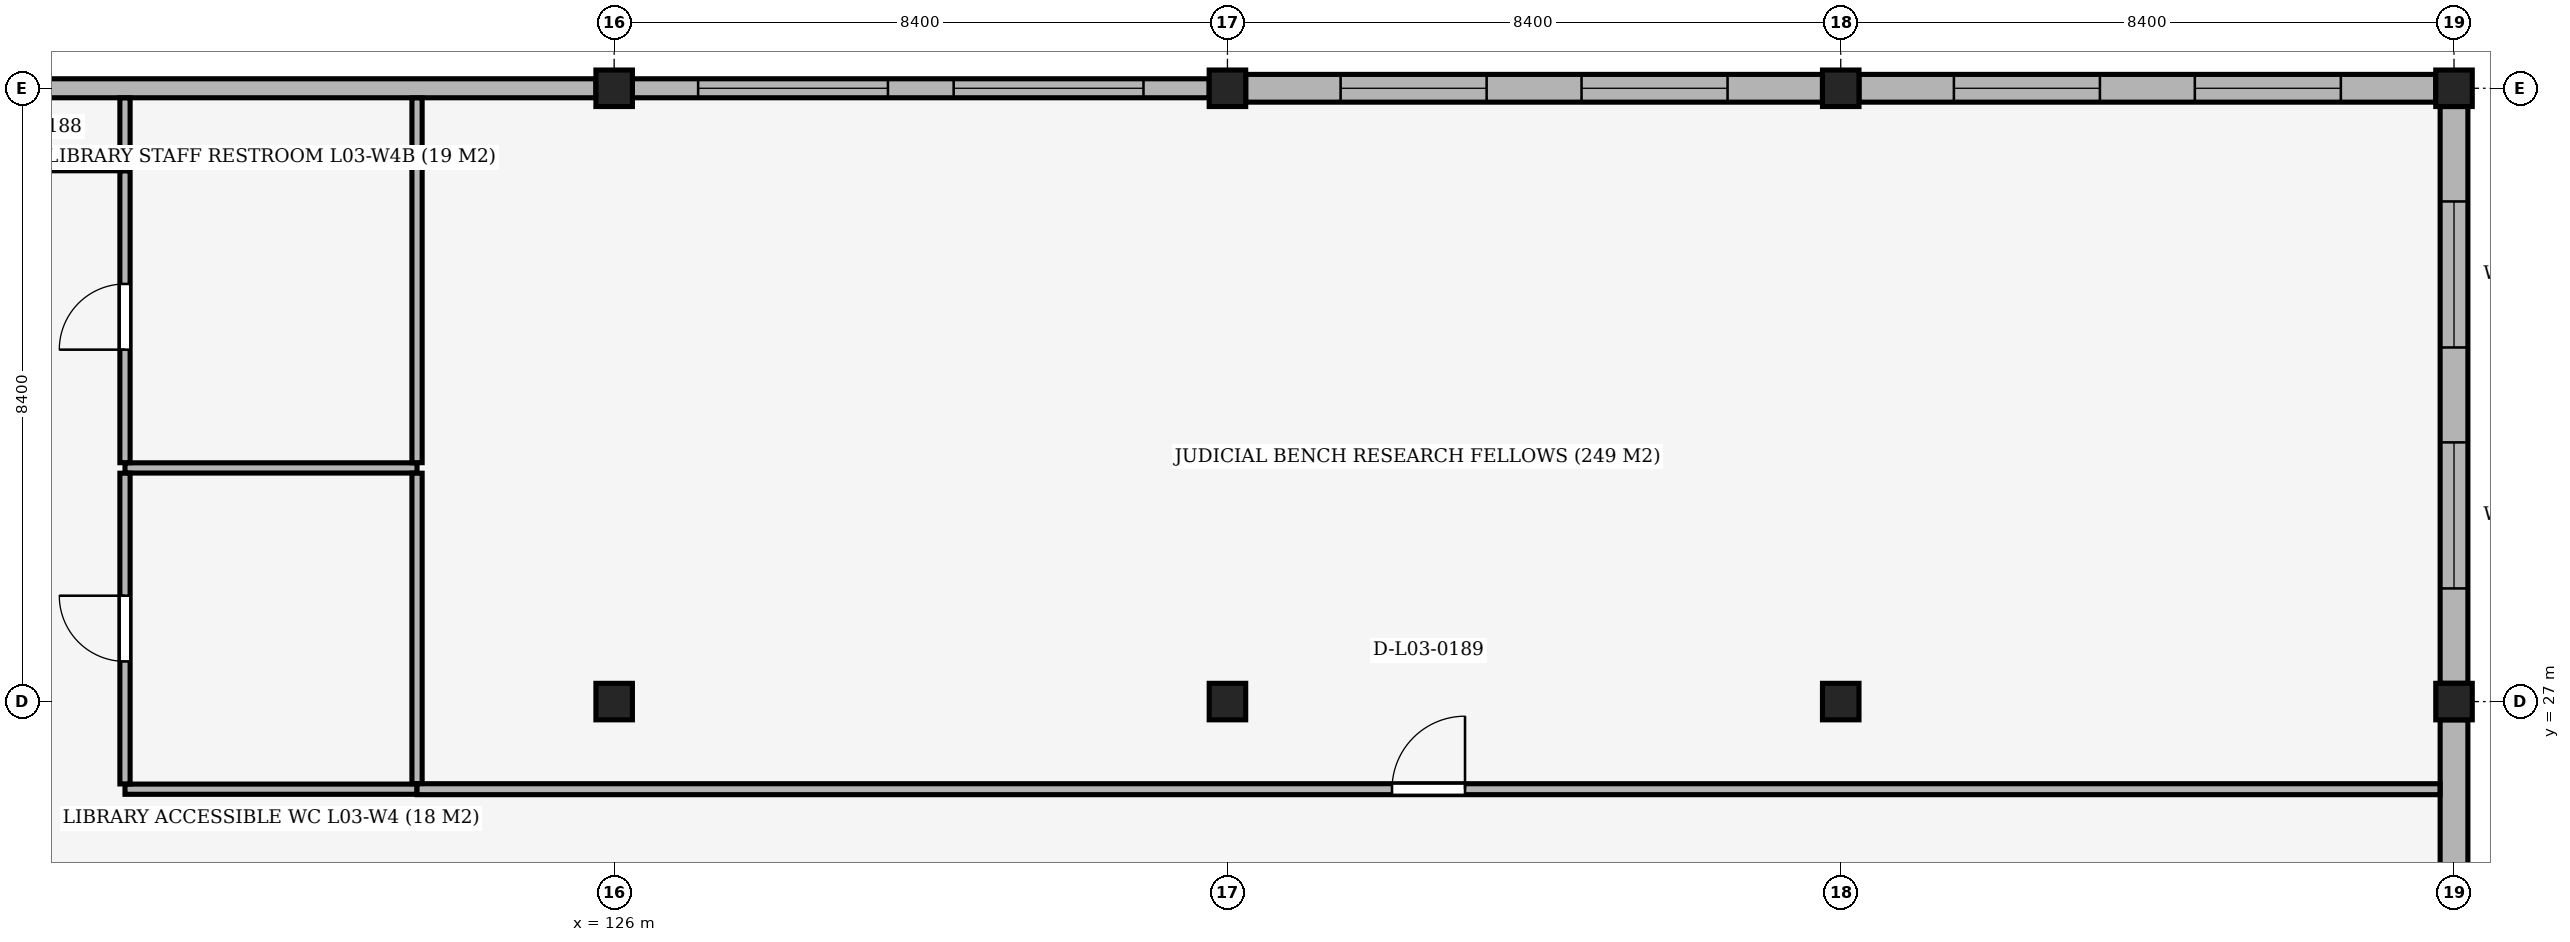
"""IFC4 building model, lengths in metres.
Left out: names, types, materials, properties, quantities, classifications, styles, units other than length and angle.
Written with IfcOpenShell. Run it as: python <this file> out.ifc"""

import sys

from ifc_helpers import new_model, si_unit, direction, frame, frame_2d, origin, origin_2d, place, context, subcontext, project, spatial, rectangle, extrude, element, fill, save


model = new_model("IFC4")
c1 = context("Model", 3, precision=1e-05, world=origin(), true_north=direction((0.0, 1.0)))
c2 = subcontext(c1, "Body", "Model", "MODEL_VIEW")
j1 = project(units=[si_unit("LENGTHUNIT", "METRE"), si_unit("PLANEANGLEUNIT", "RADIAN")], contexts=[c1])
p1 = place(None, origin())
s1 = spatial("IfcSite", under=j1, at=p1, CompositionType="ELEMENT")
p2 = place(p1, origin())
s2 = spatial("IfcBuilding", under=s1, at=p2, CompositionType="ELEMENT")
p3 = place(p2, frame((0.0, 0.0, 15.3)))
s3 = spatial("IfcBuildingStorey", under=s2, at=p3, CompositionType="ELEMENT", Elevation=15.3)
for number, where, z_axis, x_axis in (
    (1, (126.0, 27.0, 0.0), (0.0, 0.0, 1.0), (1.0, 0.0, 0.0)),
    (2, (126.0, 35.4, 0.0), (0.0, 0.0, 1.0), (1.0, 0.0, 0.0)),
    (3, (134.4, 27.0, 0.0), (0.0, 0.0, 1.0), (1.0, 0.0, 0.0)),
    (4, (134.4, 35.4, 0.0), (0.0, 0.0, 1.0), (1.0, 0.0, 0.0)),
    (5, (142.8, 27.0, 0.0), (0.0, 0.0, 1.0), (1.0, 0.0, 0.0)),
    (6, (142.8, 35.4, 0.0), (0.0, 0.0, 1.0), (1.0, 0.0, 0.0)),
    (7, (151.2, 27.0, 0.0), (0.0, 0.0, 1.0), (1.0, 0.0, 0.0)),
    (8, (151.2, 35.4, 0.0), (0.0, 0.0, 1.0), (1.0, 0.0, 0.0)),
):
    element("IfcColumn", number, at=place(p3, frame(where, z_axis=z_axis, x_axis=x_axis)), inside=s3, PredefinedType="COLUMN", context=c2, shape_type="SweptSolid", body=[
        extrude(rectangle(XDim=0.5, YDim=0.5, at=origin_2d()), origin(), (0.0, 0.0, 1.0), 5.1),
    ])
p4 = place(p3, frame((151.2, 35.15, 0.0), z_axis=(0.0, 0.0, 1.0), x_axis=(0.0, -1.0, 0.0)))
e9 = element("IfcWall", 9, at=p4, inside=s3, PredefinedType="SOLIDWALL", context=c2, shape_type="SweptSolid", body=[
    extrude(rectangle(XDim=7.9, YDim=0.38, at=frame_2d((3.95, 0.0))), origin(), (0.0, 0.0, 1.0), 4.14),
])
p5 = place(p4, frame((1.3, 0.0, 2.1)))
e10 = element("IfcOpeningElement", 10, at=p5, cuts=e9, PredefinedType="OPENING", context=c2, shape_type="SweptSolid", body=[
    extrude(rectangle(XDim=2.0, YDim=1.2, at=frame_2d((1.0, 0.6))), frame((0.0, 0.205, 0.0), z_axis=(0.0, -1.0, 0.0), x_axis=(1.0, 0.0, 0.0)), (0.0, 0.0, 1.0), 0.41),
])
p6 = place(p4, frame((4.6, 0.0, 2.1)))
e11 = element("IfcOpeningElement", 11, at=p6, cuts=e9, PredefinedType="OPENING", context=c2, shape_type="SweptSolid", body=[
    extrude(rectangle(XDim=2.0, YDim=1.2, at=frame_2d((1.0, 0.6))), frame((0.0, 0.205, 0.0), z_axis=(0.0, -1.0, 0.0), x_axis=(1.0, 0.0, 0.0)), (0.0, 0.0, 1.0), 0.41),
])
p7 = place(p3, frame((151.2, 26.75, 0.0), z_axis=(0.0, 0.0, 1.0), x_axis=(0.0, -1.0, 0.0)))
e12 = element("IfcWall", 12, at=p7, inside=s3, PredefinedType="SOLIDWALL", context=c2, shape_type="SweptSolid", body=[
    extrude(rectangle(XDim=4.3, YDim=0.38, at=frame_2d((2.15, 0.0))), origin(), (0.0, 0.0, 1.0), 3.79),
])
p8 = place(p3, frame((117.85, 35.4, 0.0), z_axis=(0.0, 0.0, 1.0), x_axis=(1.0, 0.0, 0.0)))
e13 = element("IfcWall", 13, at=p8, inside=s3, PredefinedType="SOLIDWALL", context=c2, shape_type="SweptSolid", body=[
    extrude(rectangle(XDim=7.9, YDim=0.26, at=frame_2d((3.95, 0.0))), origin(), (0.0, 0.0, 1.0), 4.14),
])
p9 = place(p3, frame((126.25, 35.4, 0.0), z_axis=(0.0, 0.0, 1.0), x_axis=(1.0, 0.0, 0.0)))
e14 = element("IfcWall", 14, at=p9, inside=s3, PredefinedType="SOLIDWALL", context=c2, shape_type="SweptSolid", body=[
    extrude(rectangle(XDim=7.9, YDim=0.26, at=frame_2d((3.95, 0.0))), origin(), (0.0, 0.0, 1.0), 4.14),
])
p10 = place(p9, frame((0.9, 0.0, 1.8)))
e15 = element("IfcOpeningElement", 15, at=p10, cuts=e14, PredefinedType="OPENING", context=c2, shape_type="SweptSolid", body=[
    extrude(rectangle(XDim=2.6, YDim=1.5, at=frame_2d((1.3, 0.75))), frame((0.0, 0.145, 0.0), z_axis=(0.0, -1.0, 0.0), x_axis=(1.0, 0.0, 0.0)), (0.0, 0.0, 1.0), 0.29),
])
p11 = place(p9, frame((4.4, 0.0, 1.8)))
e16 = element("IfcOpeningElement", 16, at=p11, cuts=e14, PredefinedType="OPENING", context=c2, shape_type="SweptSolid", body=[
    extrude(rectangle(XDim=2.6, YDim=1.5, at=frame_2d((1.3, 0.75))), frame((0.0, 0.145, 0.0), z_axis=(0.0, -1.0, 0.0), x_axis=(1.0, 0.0, 0.0)), (0.0, 0.0, 1.0), 0.29),
])
p12 = place(p3, frame((134.65, 35.4, 0.0), z_axis=(0.0, 0.0, 1.0), x_axis=(1.0, 0.0, 0.0)))
e17 = element("IfcWall", 17, at=p12, inside=s3, PredefinedType="SOLIDWALL", context=c2, shape_type="SweptSolid", body=[
    extrude(rectangle(XDim=7.9, YDim=0.38, at=frame_2d((3.95, 0.0))), origin(), (0.0, 0.0, 1.0), 4.14),
])
p13 = place(p12, frame((1.3, 0.0, 2.1)))
e18 = element("IfcOpeningElement", 18, at=p13, cuts=e17, PredefinedType="OPENING", context=c2, shape_type="SweptSolid", body=[
    extrude(rectangle(XDim=2.0, YDim=1.2, at=frame_2d((1.0, 0.6))), frame((0.0, 0.205, 0.0), z_axis=(0.0, -1.0, 0.0), x_axis=(1.0, 0.0, 0.0)), (0.0, 0.0, 1.0), 0.41),
])
p14 = place(p12, frame((4.6, 0.0, 2.1)))
e19 = element("IfcOpeningElement", 19, at=p14, cuts=e17, PredefinedType="OPENING", context=c2, shape_type="SweptSolid", body=[
    extrude(rectangle(XDim=2.0, YDim=1.2, at=frame_2d((1.0, 0.6))), frame((0.0, 0.205, 0.0), z_axis=(0.0, -1.0, 0.0), x_axis=(1.0, 0.0, 0.0)), (0.0, 0.0, 1.0), 0.41),
])
p15 = place(p3, frame((143.05, 35.4, 0.0), z_axis=(0.0, 0.0, 1.0), x_axis=(1.0, 0.0, 0.0)))
e20 = element("IfcWall", 20, at=p15, inside=s3, PredefinedType="SOLIDWALL", context=c2, shape_type="SweptSolid", body=[
    extrude(rectangle(XDim=7.9, YDim=0.38, at=frame_2d((3.95, 0.0))), origin(), (0.0, 0.0, 1.0), 4.14),
])
p16 = place(p15, frame((1.3, 0.0, 2.1)))
e21 = element("IfcOpeningElement", 21, at=p16, cuts=e20, PredefinedType="OPENING", context=c2, shape_type="SweptSolid", body=[
    extrude(rectangle(XDim=2.0, YDim=1.2, at=frame_2d((1.0, 0.6))), frame((0.0, 0.205, 0.0), z_axis=(0.0, -1.0, 0.0), x_axis=(1.0, 0.0, 0.0)), (0.0, 0.0, 1.0), 0.41),
])
p17 = place(p15, frame((4.6, 0.0, 2.1)))
e22 = element("IfcOpeningElement", 22, at=p17, cuts=e20, PredefinedType="OPENING", context=c2, shape_type="SweptSolid", body=[
    extrude(rectangle(XDim=2.0, YDim=1.2, at=frame_2d((1.0, 0.6))), frame((0.0, 0.205, 0.0), z_axis=(0.0, -1.0, 0.0), x_axis=(1.0, 0.0, 0.0)), (0.0, 0.0, 1.0), 0.41),
])
p18 = place(p3, frame((119.3, 25.8, 0.0), z_axis=(0.0, 0.0, 1.0), x_axis=(1.0, 0.0, 0.0)))
e23 = element("IfcWall", 23, at=p18, inside=s3, PredefinedType="PARTITIONING", context=c2, shape_type="SweptSolid", body=[
    extrude(rectangle(XDim=4.0, YDim=0.14, at=frame_2d((2.0, 0.0))), origin(), (0.0, 0.0, 1.0), 4.84),
])
p19 = place(p3, frame((123.3, 25.8, 0.0), z_axis=(0.0, 0.0, 1.0), x_axis=(1.0, 0.0, 0.0)))
e24 = element("IfcWall", 24, at=p19, inside=s3, PredefinedType="PARTITIONING", context=c2, shape_type="SweptSolid", body=[
    extrude(rectangle(XDim=27.708, YDim=0.15, at=frame_2d((13.854, 0.0))), origin(), (0.0, 0.0, 1.0), 4.29),
])
p20 = place(p19, frame((13.354, 0.0, 0.0)))
e25 = element("IfcOpeningElement", 25, at=p20, cuts=e24, PredefinedType="OPENING", context=c2, shape_type="SweptSolid", body=[
    extrude(rectangle(XDim=1.0, YDim=2.1, at=frame_2d((0.5, 1.05))), frame((0.0, 0.09, 0.0), z_axis=(0.0, -1.0, 0.0), x_axis=(1.0, 0.0, 0.0)), (0.0, 0.0, 1.0), 0.18),
])
p21 = place(p3, frame((119.3, 30.2, 0.0), z_axis=(0.0, 0.0, 1.0), x_axis=(1.0, 0.0, 0.0)))
e26 = element("IfcWall", 26, at=p21, inside=s3, PredefinedType="PARTITIONING", context=c2, shape_type="SweptSolid", body=[
    extrude(rectangle(XDim=4.0, YDim=0.14, at=frame_2d((2.0, 0.0))), origin(), (0.0, 0.0, 1.0), 4.84),
])
p22 = place(p3, frame((116.5, 34.4, 0.0), z_axis=(0.0, 0.0, 1.0), x_axis=(1.0, 0.0, 0.0)))
e27 = element("IfcWall", 27, at=p22, inside=s3, PredefinedType="PARTITIONING", context=c2, shape_type="SweptSolid", body=[
    extrude(rectangle(XDim=2.8, YDim=0.26, at=frame_2d((1.4, 0.0))), origin(), (0.0, 0.0, 1.0), 4.14),
])
p23 = place(p3, frame((119.3, 25.872, 0.0), z_axis=(0.0, 0.0, 1.0), x_axis=(0.0, 1.0, 0.0)))
e28 = element("IfcWall", 28, at=p23, inside=s3, PredefinedType="PARTITIONING", context=c2, shape_type="SweptSolid", body=[
    extrude(rectangle(XDim=4.256, YDim=0.14, at=frame_2d((2.128, 0.0))), origin(), (0.0, 0.0, 1.0), 4.14),
])
p24 = place(p23, frame((1.678, 0.0, 0.0)))
e29 = element("IfcOpeningElement", 29, at=p24, cuts=e28, PredefinedType="OPENING", context=c2, shape_type="SweptSolid", body=[
    extrude(rectangle(XDim=0.9, YDim=2.1, at=frame_2d((0.45, 1.05))), frame((0.0, 0.085, 0.0), z_axis=(0.0, -1.0, 0.0), x_axis=(1.0, 0.0, 0.0)), (0.0, 0.0, 1.0), 0.17),
])
p25 = place(p3, frame((119.3, 30.272, 0.0), z_axis=(0.0, 0.0, 1.0), x_axis=(0.0, 1.0, 0.0)))
e30 = element("IfcWall", 30, at=p25, inside=s3, PredefinedType="PARTITIONING", context=c2, shape_type="SweptSolid", body=[
    extrude(rectangle(XDim=3.996, YDim=0.14, at=frame_2d((1.998, 0.0))), origin(), (0.0, 0.0, 1.0), 4.54),
])
p26 = place(p25, frame((1.548, 0.0, 0.0)))
e31 = element("IfcOpeningElement", 31, at=p26, cuts=e30, PredefinedType="OPENING", context=c2, shape_type="SweptSolid", body=[
    extrude(rectangle(XDim=0.9, YDim=2.1, at=frame_2d((0.45, 1.05))), frame((0.0, 0.085, 0.0), z_axis=(0.0, -1.0, 0.0), x_axis=(1.0, 0.0, 0.0)), (0.0, 0.0, 1.0), 0.17),
])
p27 = place(p3, frame((119.3, 34.532, 0.0), z_axis=(0.0, 0.0, 1.0), x_axis=(0.0, 1.0, 0.0)))
e32 = element("IfcWall", 32, at=p27, inside=s3, PredefinedType="PARTITIONING", context=c2, shape_type="SweptSolid", body=[
    extrude(rectangle(XDim=0.736, YDim=0.14, at=frame_2d((0.368, 0.0))), origin(), (0.0, 0.0, 1.0), 4.14),
])
p28 = place(p3, frame((123.3, 25.877, 0.0), z_axis=(0.0, 0.0, 1.0), x_axis=(0.0, 1.0, 0.0)))
e33 = element("IfcWall", 33, at=p28, inside=s3, PredefinedType="PARTITIONING", context=c2, shape_type="SweptSolid", body=[
    extrude(rectangle(XDim=4.251, YDim=0.14, at=frame_2d((2.125, 0.0))), origin(), (0.0, 0.0, 1.0), 4.14),
])
p29 = place(p3, frame((123.3, 30.272, 0.0), z_axis=(0.0, 0.0, 1.0), x_axis=(0.0, 1.0, 0.0)))
e34 = element("IfcWall", 34, at=p29, inside=s3, PredefinedType="PARTITIONING", context=c2, shape_type="SweptSolid", body=[
    extrude(rectangle(XDim=4.996, YDim=0.14, at=frame_2d((2.498, 0.0))), origin(), (0.0, 0.0, 1.0), 4.14),
])
p30 = place(p5, origin())
e35 = element("IfcWindow", 35, at=p30, inside=s3, PartitioningType="SINGLE_PANEL", PredefinedType="WINDOW", context=c2, shape_type="SweptSolid", body=[
    extrude(rectangle(XDim=2.0, YDim=1.2, at=frame_2d((1.0, 0.6))), frame((0.0, 0.03, 0.0), z_axis=(0.0, -1.0, 0.0), x_axis=(1.0, 0.0, 0.0)), (0.0, 0.0, 1.0), 0.06),
])
fill(e10, e35)
p31 = place(p6, origin())
e36 = element("IfcWindow", 36, at=p31, inside=s3, PartitioningType="SINGLE_PANEL", PredefinedType="WINDOW", context=c2, shape_type="SweptSolid", body=[
    extrude(rectangle(XDim=2.0, YDim=1.2, at=frame_2d((1.0, 0.6))), frame((0.0, 0.03, 0.0), z_axis=(0.0, -1.0, 0.0), x_axis=(1.0, 0.0, 0.0)), (0.0, 0.0, 1.0), 0.06),
])
fill(e11, e36)
p32 = place(p10, origin())
e37 = element("IfcWindow", 37, at=p32, inside=s3, PartitioningType="SINGLE_PANEL", PredefinedType="WINDOW", context=c2, shape_type="SweptSolid", body=[
    extrude(rectangle(XDim=2.6, YDim=1.5, at=frame_2d((1.3, 0.75))), frame((0.0, 0.03, 0.0), z_axis=(0.0, -1.0, 0.0), x_axis=(1.0, 0.0, 0.0)), (0.0, 0.0, 1.0), 0.06),
])
fill(e15, e37)
p33 = place(p11, origin())
e38 = element("IfcWindow", 38, at=p33, inside=s3, PartitioningType="SINGLE_PANEL", PredefinedType="WINDOW", context=c2, shape_type="SweptSolid", body=[
    extrude(rectangle(XDim=2.6, YDim=1.5, at=frame_2d((1.3, 0.75))), frame((0.0, 0.03, 0.0), z_axis=(0.0, -1.0, 0.0), x_axis=(1.0, 0.0, 0.0)), (0.0, 0.0, 1.0), 0.06),
])
fill(e16, e38)
p34 = place(p13, origin())
e39 = element("IfcWindow", 39, at=p34, inside=s3, PartitioningType="SINGLE_PANEL", PredefinedType="WINDOW", context=c2, shape_type="SweptSolid", body=[
    extrude(rectangle(XDim=2.0, YDim=1.2, at=frame_2d((1.0, 0.6))), frame((0.0, 0.03, 0.0), z_axis=(0.0, -1.0, 0.0), x_axis=(1.0, 0.0, 0.0)), (0.0, 0.0, 1.0), 0.06),
])
fill(e18, e39)
p35 = place(p14, origin())
e40 = element("IfcWindow", 40, at=p35, inside=s3, PartitioningType="SINGLE_PANEL", PredefinedType="WINDOW", context=c2, shape_type="SweptSolid", body=[
    extrude(rectangle(XDim=2.0, YDim=1.2, at=frame_2d((1.0, 0.6))), frame((0.0, 0.03, 0.0), z_axis=(0.0, -1.0, 0.0), x_axis=(1.0, 0.0, 0.0)), (0.0, 0.0, 1.0), 0.06),
])
fill(e19, e40)
p36 = place(p16, origin())
e41 = element("IfcWindow", 41, at=p36, inside=s3, PartitioningType="SINGLE_PANEL", PredefinedType="WINDOW", context=c2, shape_type="SweptSolid", body=[
    extrude(rectangle(XDim=2.0, YDim=1.2, at=frame_2d((1.0, 0.6))), frame((0.0, 0.03, 0.0), z_axis=(0.0, -1.0, 0.0), x_axis=(1.0, 0.0, 0.0)), (0.0, 0.0, 1.0), 0.06),
])
fill(e21, e41)
p37 = place(p17, origin())
e42 = element("IfcWindow", 42, at=p37, inside=s3, PartitioningType="SINGLE_PANEL", PredefinedType="WINDOW", context=c2, shape_type="SweptSolid", body=[
    extrude(rectangle(XDim=2.0, YDim=1.2, at=frame_2d((1.0, 0.6))), frame((0.0, 0.03, 0.0), z_axis=(0.0, -1.0, 0.0), x_axis=(1.0, 0.0, 0.0)), (0.0, 0.0, 1.0), 0.06),
])
fill(e22, e42)
p38 = place(p24, origin())
e43 = element("IfcDoor", 43, at=p38, inside=s3, OperationType="SINGLE_SWING_RIGHT", PredefinedType="DOOR", context=c2, shape_type="SweptSolid", body=[
    extrude(rectangle(XDim=0.9, YDim=2.1, at=frame_2d((0.45, 1.05))), frame((0.0, 0.025, 0.0), z_axis=(0.0, -1.0, 0.0), x_axis=(1.0, 0.0, 0.0)), (0.0, 0.0, 1.0), 0.05),
])
fill(e29, e43)
p39 = place(p26, origin())
e44 = element("IfcDoor", 44, at=p39, inside=s3, OperationType="SINGLE_SWING_LEFT", PredefinedType="DOOR", context=c2, shape_type="SweptSolid", body=[
    extrude(rectangle(XDim=0.9, YDim=2.1, at=frame_2d((0.45, 1.05))), frame((0.0, 0.025, 0.0), z_axis=(0.0, -1.0, 0.0), x_axis=(1.0, 0.0, 0.0)), (0.0, 0.0, 1.0), 0.05),
])
fill(e31, e44)
p40 = place(p20, origin())
e45 = element("IfcDoor", 45, at=p40, inside=s3, OperationType="SINGLE_SWING_RIGHT", PredefinedType="DOOR", context=c2, shape_type="SweptSolid", body=[
    extrude(rectangle(XDim=1.0, YDim=2.1, at=frame_2d((0.5, 1.05))), frame((0.0, 0.025, 0.0), z_axis=(0.0, -1.0, 0.0), x_axis=(1.0, 0.0, 0.0)), (0.0, 0.0, 1.0), 0.05),
])
fill(e25, e45)
save(model, sys.argv[1])
